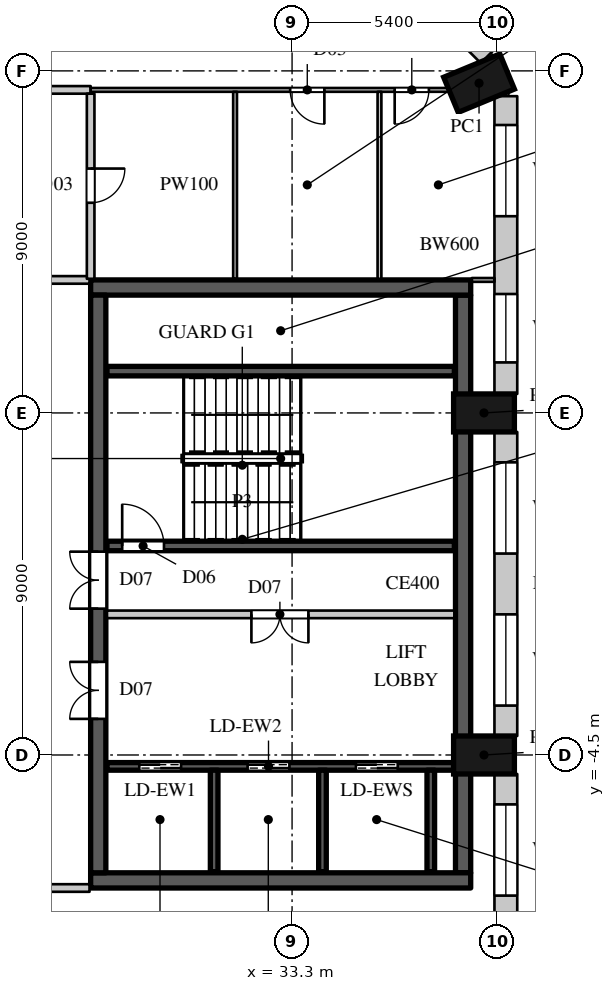
"""IFC4 building model, lengths in metres.
Left out: names, types, materials, properties, quantities, classifications, styles, units other than length and angle.
Written with IfcOpenShell. Run it as: python <this file> out.ifc"""

import sys

from ifc_helpers import new_model, si_unit, direction, frame, frame_2d, origin, origin_2d, place, context, subcontext, project, spatial, rectangle, extrude, element, fill, save


model = new_model("IFC4")
c1 = context("Model", 3, precision=1e-05, world=origin(), true_north=direction((0.0, 1.0)))
c2 = subcontext(c1, "Body", "Model", "MODEL_VIEW")
j1 = project(units=[si_unit("LENGTHUNIT", "METRE"), si_unit("PLANEANGLEUNIT", "RADIAN")], contexts=[c1])
p1 = place(None, origin())
s1 = spatial("IfcSite", under=j1, at=p1, CompositionType="ELEMENT")
p2 = place(p1, origin())
s2 = spatial("IfcBuilding", under=s1, at=p2, CompositionType="ELEMENT")
p3 = place(p2, frame((0.0, 0.0, 36.0)))
s3 = spatial("IfcBuildingStorey", under=s2, at=p3, CompositionType="ELEMENT", Elevation=36.0)
for number, where, z_axis, x_axis in (
    (1, (38.35, -4.5, 0.0), (0.0, 0.0, 1.0), (0.0, 1.0, 0.0)),
    (2, (38.35, 4.5, 0.0), (0.0, 0.0, 1.0), (0.0, 1.0, 0.0)),
    (3, (38.219, 13.177, 0.0), (0.0, 0.0, 1.0), (-0.383, 0.924, 0.0)),
):
    element("IfcColumn", number, at=place(p3, frame(where, z_axis=z_axis, x_axis=x_axis)), inside=s3, PredefinedType="COLUMN", context=c2, shape_type="SweptSolid", body=[
        extrude(rectangle(XDim=1.0, YDim=1.6, at=origin_2d()), origin(), (0.0, 0.0, 1.0), 8.0),
    ])
p4 = place(p3, frame((38.925, -13.0, 0.0), z_axis=(0.0, 0.0, 1.0), x_axis=(0.0, 1.0, 0.0)))
e4 = element("IfcWall", 4, at=p4, inside=s3, PredefinedType="ELEMENTEDWALL", context=c2, shape_type="SweptSolid", body=[
    extrude(rectangle(XDim=8.0, YDim=0.6, at=frame_2d((4.0, 0.0))), origin(), (0.0, 0.0, 1.0), 7.6),
])
p5 = place(p4, frame((0.8, 0.0, 1.5)))
e5 = element("IfcOpeningElement", 5, at=p5, cuts=e4, PredefinedType="OPENING", context=c2, shape_type="SweptSolid", body=[
    extrude(rectangle(XDim=2.4, YDim=2.4, at=frame_2d((1.2, 1.2))), frame((0.0, 0.31, 0.0), z_axis=(0.0, -1.0, 0.0), x_axis=(1.0, 0.0, 0.0)), (0.0, 0.0, 1.0), 0.62),
])
p6 = place(p4, frame((4.8, 0.0, 1.5)))
e6 = element("IfcOpeningElement", 6, at=p6, cuts=e4, PredefinedType="OPENING", context=c2, shape_type="SweptSolid", body=[
    extrude(rectangle(XDim=2.4, YDim=2.4, at=frame_2d((1.2, 1.2))), frame((0.0, 0.31, 0.0), z_axis=(0.0, -1.0, 0.0), x_axis=(1.0, 0.0, 0.0)), (0.0, 0.0, 1.0), 0.62),
])
p7 = place(p3, frame((38.925, -4.0, 0.0), z_axis=(0.0, 0.0, 1.0), x_axis=(0.0, 1.0, 0.0)))
e7 = element("IfcWall", 7, at=p7, inside=s3, PredefinedType="ELEMENTEDWALL", context=c2, shape_type="SweptSolid", body=[
    extrude(rectangle(XDim=8.0, YDim=0.6, at=frame_2d((4.0, 0.0))), origin(), (0.0, 0.0, 1.0), 7.6),
])
p8 = place(p7, frame((0.8, 0.0, 1.5)))
e8 = element("IfcOpeningElement", 8, at=p8, cuts=e7, PredefinedType="OPENING", context=c2, shape_type="SweptSolid", body=[
    extrude(rectangle(XDim=2.4, YDim=2.4, at=frame_2d((1.2, 1.2))), frame((0.0, 0.31, 0.0), z_axis=(0.0, -1.0, 0.0), x_axis=(1.0, 0.0, 0.0)), (0.0, 0.0, 1.0), 0.62),
])
p9 = place(p7, frame((4.8, 0.0, 1.5)))
e9 = element("IfcOpeningElement", 9, at=p9, cuts=e7, PredefinedType="OPENING", context=c2, shape_type="SweptSolid", body=[
    extrude(rectangle(XDim=2.4, YDim=2.4, at=frame_2d((1.2, 1.2))), frame((0.0, 0.31, 0.0), z_axis=(0.0, -1.0, 0.0), x_axis=(1.0, 0.0, 0.0)), (0.0, 0.0, 1.0), 0.62),
])
p10 = place(p3, frame((38.925, 5.0, 0.0), z_axis=(0.0, 0.0, 1.0), x_axis=(0.0, 1.0, 0.0)))
e10 = element("IfcWall", 10, at=p10, inside=s3, PredefinedType="ELEMENTEDWALL", context=c2, shape_type="SweptSolid", body=[
    extrude(rectangle(XDim=7.834, YDim=0.6, at=frame_2d((3.917, 0.0))), origin(), (0.0, 0.0, 1.0), 7.6),
])
p11 = place(p10, frame((4.676, 0.0, 1.5)))
e11 = element("IfcOpeningElement", 11, at=p11, cuts=e10, PredefinedType="OPENING", context=c2, shape_type="SweptSolid", body=[
    extrude(rectangle(XDim=2.4, YDim=2.4, at=frame_2d((1.2, 1.2))), frame((0.0, 0.31, 0.0), z_axis=(0.0, -1.0, 0.0), x_axis=(1.0, 0.0, 0.0)), (0.0, 0.0, 1.0), 0.62),
])
p12 = place(p10, frame((0.829, 0.0, 1.5)))
e12 = element("IfcOpeningElement", 12, at=p12, cuts=e10, PredefinedType="OPENING", context=c2, shape_type="SweptSolid", body=[
    extrude(rectangle(XDim=1.8, YDim=2.4, at=frame_2d((0.9, 1.2))), frame((0.0, 0.31, 0.0), z_axis=(0.0, -1.0, 0.0), x_axis=(1.0, 0.0, 0.0)), (0.0, 0.0, 1.0), 0.62),
])
p13 = place(p3, frame((38.476, 13.917, 0.0), z_axis=(0.0, 0.0, 1.0), x_axis=(-0.707092804673, 0.707120757424, 0.0)))
e13 = element("IfcWall", 13, at=p13, inside=s3, PredefinedType="ELEMENTEDWALL", context=c2, shape_type="SweptSolid", body=[
    extrude(rectangle(XDim=8.734, YDim=0.6, at=frame_2d((4.367, 0.0))), origin(), (0.0, 0.0, 1.0), 7.6),
])
p14 = place(p13, frame((0.833, 0.0, 1.5)))
e14 = element("IfcOpeningElement", 14, at=p14, cuts=e13, PredefinedType="OPENING", context=c2, shape_type="SweptSolid", body=[
    extrude(rectangle(XDim=2.7, YDim=2.4, at=frame_2d((1.35, 1.2))), frame((0.0, 0.31, 0.0), z_axis=(0.0, -1.0, 0.0), x_axis=(1.0, 0.0, 0.0)), (0.0, 0.0, 1.0), 0.62),
])
p15 = place(p13, frame((5.2, 0.0, 1.5)))
e15 = element("IfcOpeningElement", 15, at=p15, cuts=e13, PredefinedType="OPENING", context=c2, shape_type="SweptSolid", body=[
    extrude(rectangle(XDim=2.7, YDim=2.4, at=frame_2d((1.35, 1.2))), frame((0.0, 0.31, 0.0), z_axis=(0.0, -1.0, 0.0), x_axis=(1.0, 0.0, 0.0)), (0.0, 0.0, 1.0), 0.62),
])
for number, where, z_axis, x_axis in (
    (16, (28.0, 7.8, 0.0), (0.0, 0.0, 1.0), (1.0, 0.0, 0.0)),
    (17, (28.0, -7.8, 0.0), (0.0, 0.0, 1.0), (1.0, 0.0, 0.0)),
):
    element("IfcWall", number, at=place(p3, frame(where, z_axis=z_axis, x_axis=x_axis)), inside=s3, PredefinedType="SHEAR", context=c2, shape_type="SweptSolid", body=[
        extrude(rectangle(XDim=10.0, YDim=0.4, at=frame_2d((5.0, 0.0))), origin(), (0.0, 0.0, 1.0), 8.0),
    ])
p16 = place(p3, frame((37.8, -7.6, 0.0), z_axis=(0.0, 0.0, 1.0), x_axis=(0.0, 1.0, 0.0)))
e18 = element("IfcWall", 18, at=p16, inside=s3, PredefinedType="SHEAR", context=c2, shape_type="SweptSolid", body=[
    extrude(rectangle(XDim=15.2, YDim=0.4, at=frame_2d((7.6, 0.0))), origin(), (0.0, 0.0, 1.0), 8.0),
])
p17 = place(p3, frame((28.2, -7.6, 0.0), z_axis=(0.0, 0.0, 1.0), x_axis=(0.0, 1.0, 0.0)))
e19 = element("IfcWall", 19, at=p17, inside=s3, PredefinedType="SHEAR", context=c2, shape_type="SweptSolid", body=[
    extrude(rectangle(XDim=15.2, YDim=0.4, at=frame_2d((7.6, 0.0))), origin(), (0.0, 0.0, 1.0), 8.0),
])
p18 = place(p17, frame((4.05, 0.0, 0.0)))
e20 = element("IfcOpeningElement", 20, at=p18, cuts=e19, PredefinedType="OPENING", context=c2, shape_type="SweptSolid", body=[
    extrude(rectangle(XDim=1.5, YDim=2.4, at=frame_2d((0.75, 1.2))), frame((0.0, 0.21, 0.0), z_axis=(0.0, -1.0, 0.0), x_axis=(1.0, 0.0, 0.0)), (0.0, 0.0, 1.0), 0.42),
])
p19 = place(p17, frame((6.95, 0.0, 0.0)))
e21 = element("IfcOpeningElement", 21, at=p19, cuts=e19, PredefinedType="OPENING", context=c2, shape_type="SweptSolid", body=[
    extrude(rectangle(XDim=1.5, YDim=2.4, at=frame_2d((0.75, 1.2))), frame((0.0, 0.21, 0.0), z_axis=(0.0, -1.0, 0.0), x_axis=(1.0, 0.0, 0.0)), (0.0, 0.0, 1.0), 0.42),
])
p20 = place(p3, frame((14.4, -8.0, 0.0), z_axis=(0.0, 0.0, 1.0), x_axis=(1.0, 0.0, 0.0)))
e22 = element("IfcWall", 22, at=p20, inside=s3, PredefinedType="PARTITIONING", context=c2, shape_type="SweptSolid", body=[
    extrude(rectangle(XDim=13.57, YDim=0.2, at=frame_2d((6.785, 0.0))), origin(), (0.0, 0.0, 1.0), 7.598),
])
p21 = place(p20, frame((8.55, 0.0, 0.0)))
e23 = element("IfcOpeningElement", 23, at=p21, cuts=e22, PredefinedType="OPENING", context=c2, shape_type="SweptSolid", body=[
    extrude(rectangle(XDim=1.6, YDim=2.4, at=frame_2d((0.8, 1.2))), frame((0.0, 0.11, 0.0), z_axis=(0.0, -1.0, 0.0), x_axis=(1.0, 0.0, 0.0)), (0.0, 0.0, 1.0), 0.22),
])
p22 = place(p20, frame((0.3, 0.0, 0.0)))
e24 = element("IfcOpeningElement", 24, at=p22, cuts=e22, PredefinedType="OPENING", context=c2, shape_type="SweptSolid", body=[
    extrude(rectangle(XDim=1.6, YDim=2.4, at=frame_2d((0.8, 1.2))), frame((0.0, 0.11, 0.0), z_axis=(0.0, -1.0, 0.0), x_axis=(1.0, 0.0, 0.0)), (0.0, 0.0, 1.0), 0.22),
])
p23 = place(p3, frame((14.4, 8.0, 0.0), z_axis=(0.0, 0.0, 1.0), x_axis=(1.0, 0.0, 0.0)))
e25 = element("IfcWall", 25, at=p23, inside=s3, PredefinedType="PARTITIONING", context=c2, shape_type="SweptSolid", body=[
    extrude(rectangle(XDim=13.57, YDim=0.2, at=frame_2d((6.785, 0.0))), origin(), (0.0, 0.0, 1.0), 7.598),
])
p24 = place(p23, frame((9.75, 0.0, 0.0)))
e26 = element("IfcOpeningElement", 26, at=p24, cuts=e25, PredefinedType="OPENING", context=c2, shape_type="SweptSolid", body=[
    extrude(rectangle(XDim=1.5, YDim=2.4, at=frame_2d((0.75, 1.2))), frame((0.0, 0.11, 0.0), z_axis=(0.0, -1.0, 0.0), x_axis=(1.0, 0.0, 0.0)), (0.0, 0.0, 1.0), 0.22),
])
p25 = place(p3, frame((23.712, 13.0, 0.0), z_axis=(0.0, 0.0, 1.0), x_axis=(1.0, 0.0, 0.0)))
e27 = element("IfcWall", 27, at=p25, inside=s3, PredefinedType="PARTITIONING", context=c2, shape_type="SweptSolid", body=[
    extrude(rectangle(XDim=4.288, YDim=0.2, at=frame_2d((2.144, 0.0))), origin(), (0.0, 0.0, 1.0), 7.598),
])
p26 = place(p25, frame((1.3, 0.0, 0.0)))
e28 = element("IfcOpeningElement", 28, at=p26, cuts=e27, PredefinedType="OPENING", context=c2, shape_type="SweptSolid", body=[
    extrude(rectangle(XDim=1.6, YDim=2.4, at=frame_2d((0.8, 1.2))), frame((0.0, 0.11, 0.0), z_axis=(0.0, -1.0, 0.0), x_axis=(1.0, 0.0, 0.0)), (0.0, 0.0, 1.0), 0.22),
])
p27 = place(p3, frame((28.0, 8.03, 0.0), z_axis=(0.0, 0.0, 1.0), x_axis=(0.0, 1.0, 0.0)))
e29 = element("IfcWall", 29, at=p27, inside=s3, PredefinedType="PARTITIONING", context=c2, shape_type="SweptSolid", body=[
    extrude(rectangle(XDim=4.87, YDim=0.2, at=frame_2d((2.435, 0.0))), origin(), (0.0, 0.0, 1.0), 7.598),
])
p28 = place(p27, frame((2.0, 0.0, 0.0)))
e30 = element("IfcOpeningElement", 30, at=p28, cuts=e29, PredefinedType="OPENING", context=c2, shape_type="SweptSolid", body=[
    extrude(rectangle(XDim=0.9, YDim=2.2, at=frame_2d((0.45, 1.1))), frame((0.0, 0.11, 0.0), z_axis=(0.0, -1.0, 0.0), x_axis=(1.0, 0.0, 0.0)), (0.0, 0.0, 1.0), 0.22),
])
p29 = place(p3, frame((28.43, -0.8, 0.0), z_axis=(0.0, 0.0, 1.0), x_axis=(1.0, 0.0, 0.0)))
e31 = element("IfcWall", 31, at=p29, inside=s3, PredefinedType="PARTITIONING", context=c2, shape_type="SweptSolid", body=[
    extrude(rectangle(XDim=9.14, YDim=0.2, at=frame_2d((4.57, 0.0))), origin(), (0.0, 0.0, 1.0), 7.598),
])
p30 = place(p29, frame((3.8, 0.0, 0.0)))
e32 = element("IfcOpeningElement", 32, at=p30, cuts=e31, PredefinedType="OPENING", context=c2, shape_type="SweptSolid", body=[
    extrude(rectangle(XDim=1.5, YDim=2.4, at=frame_2d((0.75, 1.2))), frame((0.0, 0.11, 0.0), z_axis=(0.0, -1.0, 0.0), x_axis=(1.0, 0.0, 0.0)), (0.0, 0.0, 1.0), 0.22),
])
p31 = place(p3, frame((28.43, -4.8, 0.0), z_axis=(0.0, 0.0, 1.0), x_axis=(1.0, 0.0, 0.0)))
e33 = element("IfcWall", 33, at=p31, inside=s3, PredefinedType="SHEAR", context=c2, shape_type="SweptSolid", body=[
    extrude(rectangle(XDim=9.13, YDim=0.2, at=frame_2d((4.565, 0.0))), origin(), (0.0, 0.0, 1.0), 7.598),
])
p32 = place(p31, frame((0.85, 0.0, 0.0)))
e34 = element("IfcOpeningElement", 34, at=p32, cuts=e33, PredefinedType="OPENING", context=c2, shape_type="SweptSolid", body=[
    extrude(rectangle(XDim=1.1, YDim=2.2, at=frame_2d((0.55, 1.1))), frame((0.0, 0.11, 0.0), z_axis=(0.0, -1.0, 0.0), x_axis=(1.0, 0.0, 0.0)), (0.0, 0.0, 1.0), 0.22),
])
p33 = place(p31, frame((3.7, 0.0, 0.0)))
e35 = element("IfcOpeningElement", 35, at=p33, cuts=e33, PredefinedType="OPENING", context=c2, shape_type="SweptSolid", body=[
    extrude(rectangle(XDim=1.1, YDim=2.2, at=frame_2d((0.55, 1.1))), frame((0.0, 0.11, 0.0), z_axis=(0.0, -1.0, 0.0), x_axis=(1.0, 0.0, 0.0)), (0.0, 0.0, 1.0), 0.22),
])
p34 = place(p31, frame((6.55, 0.0, 0.0)))
e36 = element("IfcOpeningElement", 36, at=p34, cuts=e33, PredefinedType="OPENING", context=c2, shape_type="SweptSolid", body=[
    extrude(rectangle(XDim=1.1, YDim=2.2, at=frame_2d((0.55, 1.1))), frame((0.0, 0.11, 0.0), z_axis=(0.0, -1.0, 0.0), x_axis=(1.0, 0.0, 0.0)), (0.0, 0.0, 1.0), 0.22),
])
for number, where, z_axis, x_axis in (
    (37, (31.25, -7.57, 0.0), (0.0, 0.0, 1.0), (0.0, 1.0, 0.0)),
    (38, (34.1, -7.57, 0.0), (0.0, 0.0, 1.0), (0.0, 1.0, 0.0)),
):
    element("IfcWall", number, at=place(p3, frame(where, z_axis=z_axis, x_axis=x_axis)), inside=s3, PredefinedType="SHEAR", context=c2, shape_type="SweptSolid", body=[
        extrude(rectangle(XDim=2.67, YDim=0.2, at=frame_2d((1.335, 0.0))), origin(), (0.0, 0.0, 1.0), 8.0),
    ])
p35 = place(p3, frame((36.95, -7.57, 0.0), z_axis=(0.0, 0.0, 1.0), x_axis=(0.0, 1.0, 0.0)))
e39 = element("IfcWall", 39, at=p35, inside=s3, PredefinedType="SHEAR", context=c2, shape_type="SweptSolid", body=[
    extrude(rectangle(XDim=2.67, YDim=0.2, at=frame_2d((1.335, 0.0))), origin(), (0.0, 0.0, 1.0), 7.598),
])
p36 = place(p3, frame((28.43, 1.0, 0.0), z_axis=(0.0, 0.0, 1.0), x_axis=(1.0, 0.0, 0.0)))
e40 = element("IfcWall", 40, at=p36, inside=s3, PredefinedType="SHEAR", context=c2, shape_type="SweptSolid", body=[
    extrude(rectangle(XDim=9.14, YDim=0.25, at=frame_2d((4.57, 0.0))), origin(), (0.0, 0.0, 1.0), 7.598),
])
p37 = place(p36, frame((0.4, 0.0, 0.0)))
e41 = element("IfcOpeningElement", 41, at=p37, cuts=e40, PredefinedType="OPENING", context=c2, shape_type="SweptSolid", body=[
    extrude(rectangle(XDim=1.1, YDim=2.2, at=frame_2d((0.55, 1.1))), frame((0.0, 0.135, 0.0), z_axis=(0.0, -1.0, 0.0), x_axis=(1.0, 0.0, 0.0)), (0.0, 0.0, 1.0), 0.27),
])
p38 = place(p3, frame((28.43, 5.6, 0.0), z_axis=(0.0, 0.0, 1.0), x_axis=(1.0, 0.0, 0.0)))
e42 = element("IfcWall", 42, at=p38, inside=s3, PredefinedType="SHEAR", context=c2, shape_type="SweptSolid", body=[
    extrude(rectangle(XDim=9.14, YDim=0.25, at=frame_2d((4.57, 0.0))), origin(), (0.0, 0.0, 1.0), 7.598),
])
p39 = place(p3, frame((28.0, 13.0, 0.0), z_axis=(0.0, 0.0, 1.0), x_axis=(1.0, 0.0, 0.0)))
e43 = element("IfcWall", 43, at=p39, inside=s3, PredefinedType="PARTITIONING", context=c2, shape_type="SweptSolid", body=[
    extrude(rectangle(XDim=9.417, YDim=0.1, at=frame_2d((4.708, 0.0))), origin(), (0.0, 0.0, 1.0), 7.598),
])
p40 = place(p39, frame((5.25, 0.0, 0.0)))
e44 = element("IfcOpeningElement", 44, at=p40, cuts=e43, PredefinedType="OPENING", context=c2, shape_type="SweptSolid", body=[
    extrude(rectangle(XDim=0.9, YDim=2.2, at=frame_2d((0.45, 1.1))), frame((0.0, 0.06, 0.0), z_axis=(0.0, -1.0, 0.0), x_axis=(1.0, 0.0, 0.0)), (0.0, 0.0, 1.0), 0.12),
])
p41 = place(p39, frame((8.0, 0.0, 0.0)))
e45 = element("IfcOpeningElement", 45, at=p41, cuts=e43, PredefinedType="OPENING", context=c2, shape_type="SweptSolid", body=[
    extrude(rectangle(XDim=0.9, YDim=2.2, at=frame_2d((0.45, 1.1))), frame((0.0, 0.06, 0.0), z_axis=(0.0, -1.0, 0.0), x_axis=(1.0, 0.0, 0.0)), (0.0, 0.0, 1.0), 0.12),
])
for number, where, z_axis, x_axis in (
    (46, (31.8, 8.03, 0.0), (0.0, 0.0, 1.0), (0.0, 1.0, 0.0)),
    (47, (35.6, 8.03, 0.0), (0.0, 0.0, 1.0), (0.0, 1.0, 0.0)),
):
    element("IfcWall", number, at=place(p3, frame(where, z_axis=z_axis, x_axis=x_axis)), inside=s3, PredefinedType="PARTITIONING", context=c2, shape_type="SweptSolid", body=[
        extrude(rectangle(XDim=4.92, YDim=0.1, at=frame_2d((2.46, 0.0))), origin(), (0.0, 0.0, 1.0), 7.598),
    ])
p42 = place(p3, frame((38.03, 8.0, 0.0), z_axis=(0.0, 0.0, 1.0), x_axis=(1.0, 0.0, 0.0)))
e48 = element("IfcWall", 48, at=p42, inside=s3, PredefinedType="PARTITIONING", context=c2, shape_type="SweptSolid", body=[
    extrude(rectangle(XDim=0.595, YDim=0.1, at=frame_2d((0.297, 0.0))), origin(), (0.0, 0.0, 1.0), 7.598),
])
p43 = place(p6, origin())
e49 = element("IfcWindow", 49, at=p43, inside=s3, PartitioningType="SINGLE_PANEL", PredefinedType="WINDOW", context=c2, shape_type="SweptSolid", body=[
    extrude(rectangle(XDim=2.4, YDim=2.4, at=frame_2d((1.2, 1.2))), frame((0.0, 0.06, 0.0), z_axis=(0.0, -1.0, 0.0), x_axis=(1.0, 0.0, 0.0)), (0.0, 0.0, 1.0), 0.06),
])
fill(e6, e49)
p44 = place(p8, origin())
e50 = element("IfcWindow", 50, at=p44, inside=s3, PartitioningType="SINGLE_PANEL", PredefinedType="WINDOW", context=c2, shape_type="SweptSolid", body=[
    extrude(rectangle(XDim=2.4, YDim=2.4, at=frame_2d((1.2, 1.2))), frame((0.0, 0.06, 0.0), z_axis=(0.0, -1.0, 0.0), x_axis=(1.0, 0.0, 0.0)), (0.0, 0.0, 1.0), 0.06),
])
fill(e8, e50)
p45 = place(p9, origin())
e51 = element("IfcWindow", 51, at=p45, inside=s3, PartitioningType="SINGLE_PANEL", PredefinedType="WINDOW", context=c2, shape_type="SweptSolid", body=[
    extrude(rectangle(XDim=2.4, YDim=2.4, at=frame_2d((1.2, 1.2))), frame((0.0, 0.06, 0.0), z_axis=(0.0, -1.0, 0.0), x_axis=(1.0, 0.0, 0.0)), (0.0, 0.0, 1.0), 0.06),
])
fill(e9, e51)
p46 = place(p11, origin())
e52 = element("IfcWindow", 52, at=p46, inside=s3, PartitioningType="SINGLE_PANEL", PredefinedType="WINDOW", context=c2, shape_type="SweptSolid", body=[
    extrude(rectangle(XDim=2.4, YDim=2.4, at=frame_2d((1.2, 1.2))), frame((0.0, 0.06, 0.0), z_axis=(0.0, -1.0, 0.0), x_axis=(1.0, 0.0, 0.0)), (0.0, 0.0, 1.0), 0.06),
])
fill(e11, e52)
p47 = place(p37, origin())
e53 = element("IfcDoor", 53, at=p47, inside=s3, OperationType="SINGLE_SWING_LEFT", PredefinedType="DOOR", context=c2, shape_type="SweptSolid", body=[
    extrude(rectangle(XDim=1.1, YDim=2.2, at=frame_2d((0.55, 1.1))), frame((0.0, 0.025, 0.0), z_axis=(0.0, -1.0, 0.0), x_axis=(1.0, 0.0, 0.0)), (0.0, 0.0, 1.0), 0.05),
])
fill(e41, e53)
p48 = place(p30, origin())
e54 = element("IfcDoor", 54, at=p48, inside=s3, OperationType="DOUBLE_DOOR_SINGLE_SWING", PredefinedType="DOOR", context=c2, shape_type="SweptSolid", body=[
    extrude(rectangle(XDim=1.5, YDim=2.4, at=frame_2d((0.75, 1.2))), frame((0.0, 0.025, 0.0), z_axis=(0.0, -1.0, 0.0), x_axis=(1.0, 0.0, 0.0)), (0.0, 0.0, 1.0), 0.05),
])
fill(e32, e54)
p49 = place(p32, origin())
e55 = element("IfcDoor", 55, at=p49, inside=s3, OperationType="DOUBLE_DOOR_SLIDING", PredefinedType="DOOR", context=c2, shape_type="SweptSolid", body=[
    extrude(rectangle(XDim=1.1, YDim=2.2, at=frame_2d((0.55, 1.1))), frame((0.0, 0.025, 0.0), z_axis=(0.0, -1.0, 0.0), x_axis=(1.0, 0.0, 0.0)), (0.0, 0.0, 1.0), 0.05),
])
fill(e34, e55)
p50 = place(p33, origin())
e56 = element("IfcDoor", 56, at=p50, inside=s3, OperationType="DOUBLE_DOOR_SLIDING", PredefinedType="DOOR", context=c2, shape_type="SweptSolid", body=[
    extrude(rectangle(XDim=1.1, YDim=2.2, at=frame_2d((0.55, 1.1))), frame((0.0, 0.025, 0.0), z_axis=(0.0, -1.0, 0.0), x_axis=(1.0, 0.0, 0.0)), (0.0, 0.0, 1.0), 0.05),
])
fill(e35, e56)
p51 = place(p34, origin())
e57 = element("IfcDoor", 57, at=p51, inside=s3, OperationType="DOUBLE_DOOR_SLIDING", PredefinedType="DOOR", context=c2, shape_type="SweptSolid", body=[
    extrude(rectangle(XDim=1.1, YDim=2.2, at=frame_2d((0.55, 1.1))), frame((0.0, 0.025, 0.0), z_axis=(0.0, -1.0, 0.0), x_axis=(1.0, 0.0, 0.0)), (0.0, 0.0, 1.0), 0.05),
])
fill(e36, e57)
p52 = place(p28, origin())
e58 = element("IfcDoor", 58, at=p52, inside=s3, OperationType="SINGLE_SWING_LEFT", PredefinedType="DOOR", context=c2, shape_type="SweptSolid", body=[
    extrude(rectangle(XDim=0.9, YDim=2.2, at=frame_2d((0.45, 1.1))), frame((0.0, 0.025, 0.0), z_axis=(0.0, -1.0, 0.0), x_axis=(1.0, 0.0, 0.0)), (0.0, 0.0, 1.0), 0.05),
])
fill(e30, e58)
p53 = place(p40, origin())
e59 = element("IfcDoor", 59, at=p53, inside=s3, OperationType="SINGLE_SWING_LEFT", PredefinedType="DOOR", context=c2, shape_type="SweptSolid", body=[
    extrude(rectangle(XDim=0.9, YDim=2.2, at=frame_2d((0.45, 1.1))), frame((0.0, 0.025, 0.0), z_axis=(0.0, -1.0, 0.0), x_axis=(1.0, 0.0, 0.0)), (0.0, 0.0, 1.0), 0.05),
])
fill(e44, e59)
p54 = place(p41, origin())
e60 = element("IfcDoor", 60, at=p54, inside=s3, OperationType="SINGLE_SWING_RIGHT", PredefinedType="DOOR", context=c2, shape_type="SweptSolid", body=[
    extrude(rectangle(XDim=0.9, YDim=2.2, at=frame_2d((0.45, 1.1))), frame((0.0, 0.025, 0.0), z_axis=(0.0, -1.0, 0.0), x_axis=(1.0, 0.0, 0.0)), (0.0, 0.0, 1.0), 0.05),
])
fill(e45, e60)
p55 = place(p18, origin())
e61 = element("IfcDoor", 61, at=p55, inside=s3, OperationType="DOUBLE_DOOR_SINGLE_SWING", PredefinedType="DOOR", context=c2, shape_type="SweptSolid", body=[
    extrude(rectangle(XDim=1.5, YDim=2.4, at=frame_2d((0.75, 1.2))), frame((0.0, 0.025, 0.0), z_axis=(0.0, -1.0, 0.0), x_axis=(1.0, 0.0, 0.0)), (0.0, 0.0, 1.0), 0.05),
])
fill(e20, e61)
p56 = place(p19, origin())
e62 = element("IfcDoor", 62, at=p56, inside=s3, OperationType="DOUBLE_DOOR_SINGLE_SWING", PredefinedType="DOOR", context=c2, shape_type="SweptSolid", body=[
    extrude(rectangle(XDim=1.5, YDim=2.4, at=frame_2d((0.75, 1.2))), frame((0.0, 0.025, 0.0), z_axis=(0.0, -1.0, 0.0), x_axis=(1.0, 0.0, 0.0)), (0.0, 0.0, 1.0), 0.05),
])
fill(e21, e62)
p57 = place(p12, origin())
e63 = element("IfcWindow", 63, at=p57, inside=s3, PartitioningType="SINGLE_PANEL", PredefinedType="WINDOW", context=c2, shape_type="SweptSolid", body=[
    extrude(rectangle(XDim=1.8, YDim=2.4, at=frame_2d((0.9, 1.2))), frame((0.0, 0.06, 0.0), z_axis=(0.0, -1.0, 0.0), x_axis=(1.0, 0.0, 0.0)), (0.0, 0.0, 1.0), 0.06),
])
fill(e12, e63)
save(model, sys.argv[1])
